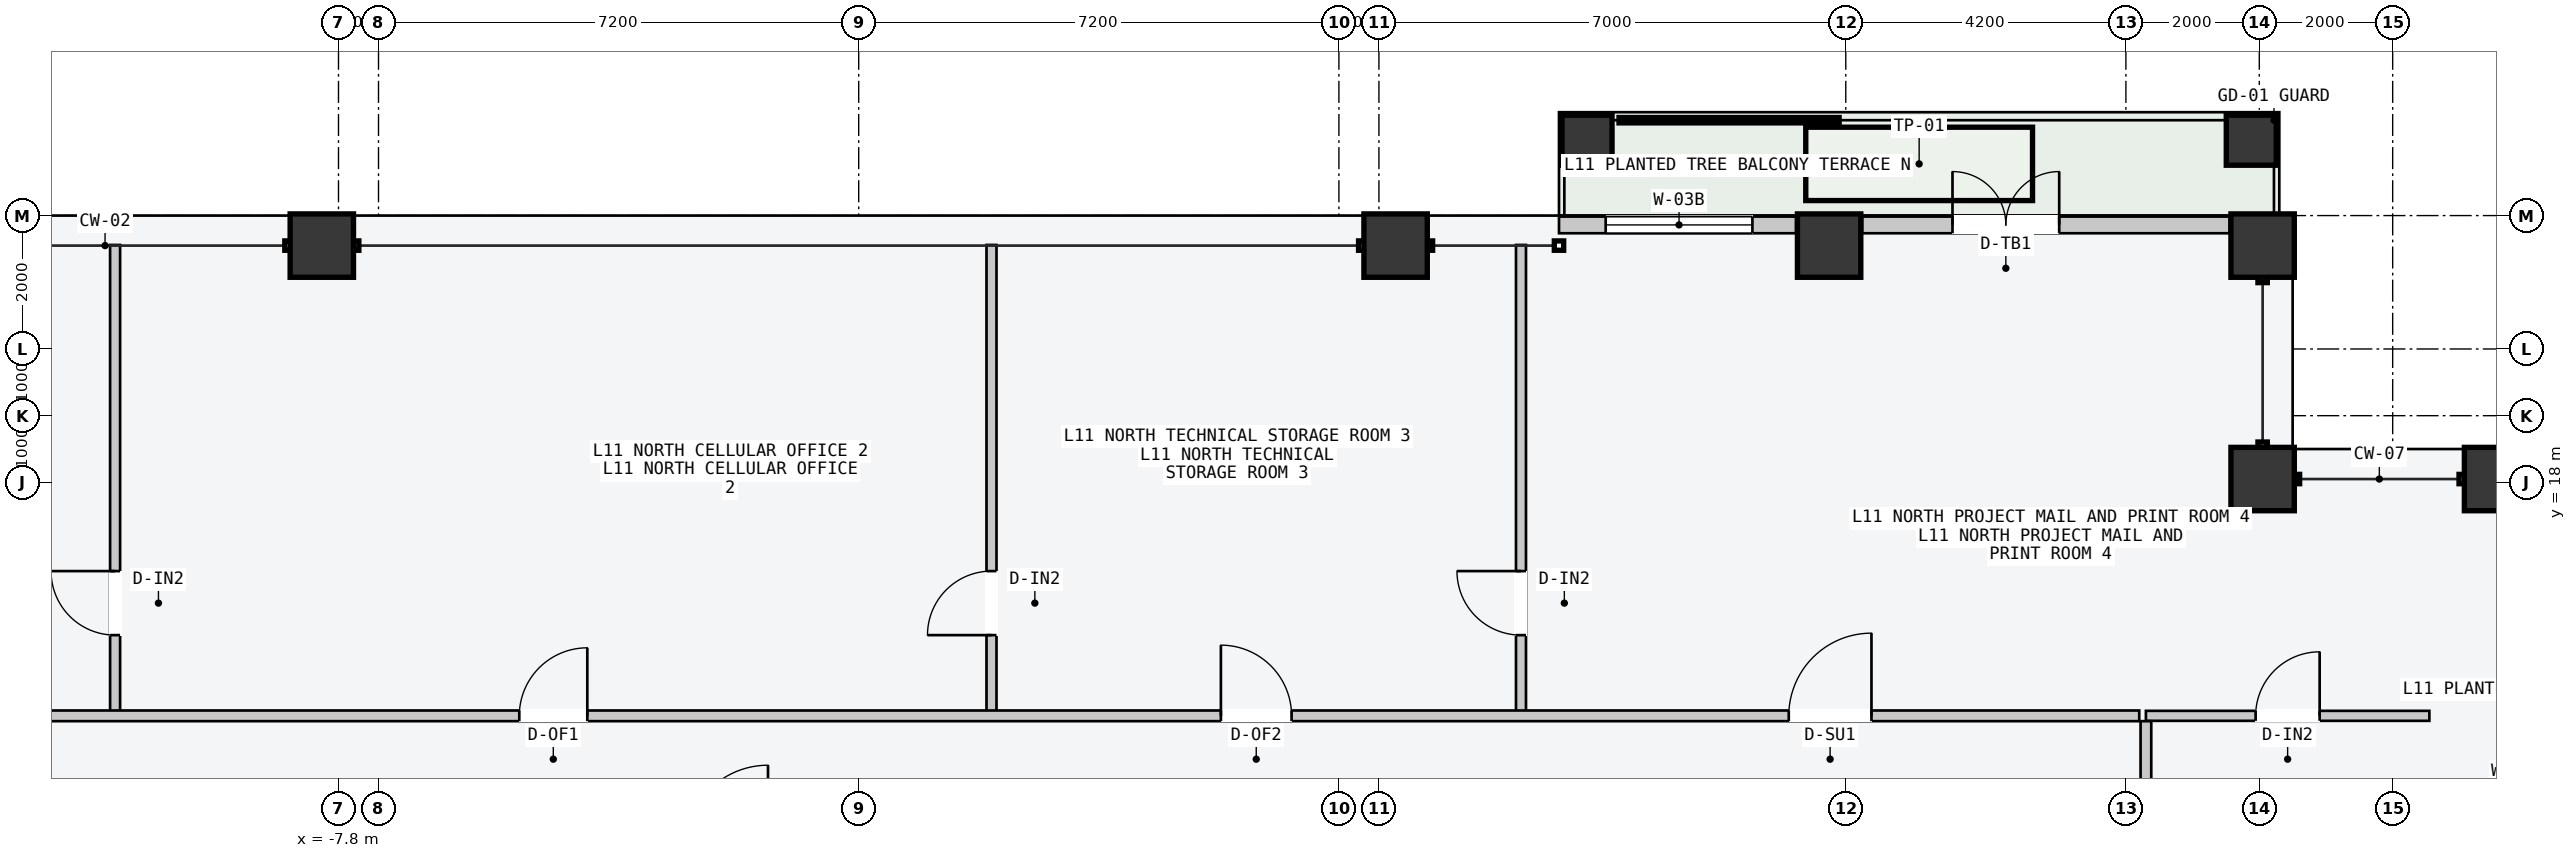
"""IFC4 building model, lengths in metres.
Left out: names, types, materials, properties, quantities, classifications, styles, units other than length and angle.
Written with IfcOpenShell. Run it as: python <this file> out.ifc"""

import sys

from ifc_helpers import new_model, si_unit, direction, frame, frame_2d, origin, origin_2d, place, context, subcontext, project, spatial, rectangle, hollow_rectangle, extrude, element, fill, save


model = new_model("IFC4")
c1 = context("Model", 3, precision=1e-05, world=origin(), true_north=direction((0.0, 1.0)))
c2 = subcontext(c1, "Body", "Model", "MODEL_VIEW")
j1 = project(units=[si_unit("LENGTHUNIT", "METRE"), si_unit("PLANEANGLEUNIT", "RADIAN")], contexts=[c1])
p1 = place(None, origin())
s1 = spatial("IfcSite", under=j1, at=p1, CompositionType="ELEMENT")
p2 = place(p1, origin())
s2 = spatial("IfcBuilding", under=s1, at=p2, CompositionType="ELEMENT")
p3 = place(p2, frame((0.0, 0.0, 45.6)))
s3 = spatial("IfcBuildingStorey", under=s2, at=p3, CompositionType="ELEMENT", Elevation=45.6)
for number, where, z_axis, x_axis in (
    (1, (-8.05, 21.55, 0.0), (0.0, 0.0, 1.0), (1.0, 0.0, 0.0)),
    (2, (8.05, 21.55, 0.0), (0.0, 0.0, 1.0), (1.0, 0.0, 0.0)),
    (3, (14.55, 21.55, 0.0), (0.0, 0.0, 1.0), (1.0, 0.0, 0.0)),
    (4, (21.05, 21.55, 0.0), (0.0, 0.0, 1.0), (1.0, 0.0, 0.0)),
    (5, (24.55, 18.05, 0.0), (0.0, 0.0, 1.0), (0.0, 1.0, 0.0)),
    (6, (21.05, 18.05, 0.0), (0.0, 0.0, 1.0), (1.0, 0.0, 0.0)),
):
    element("IfcColumn", number, at=place(p3, frame(where, z_axis=z_axis, x_axis=x_axis)), inside=s3, PredefinedType="COLUMN", context=c2, shape_type="SweptSolid", body=[
        extrude(hollow_rectangle(XDim=0.95, YDim=0.95, WallThickness=0.048, at=origin_2d()), origin(), (0.0, 0.0, 1.0), 3.6),
    ])
for number, where, z_axis, x_axis in (
    (7, (10.92, 23.13, 0.0), (0.0, 0.0, 1.0), (1.0, 0.0, 0.0)),
    (8, (20.88, 23.13, 0.0), (0.0, 0.0, 1.0), (1.0, 0.0, 0.0)),
):
    element("IfcColumn", number, at=place(p3, frame(where, z_axis=z_axis, x_axis=x_axis)), inside=s3, PredefinedType="COLUMN", context=c2, shape_type="SweptSolid", body=[
        extrude(hollow_rectangle(XDim=0.75, YDim=0.75, WallThickness=0.032, at=origin_2d()), origin(), (0.0, 0.0, 1.0), 3.6),
    ])
p4 = place(p3, frame((10.5, 21.86, 0.0), z_axis=(0.0, 0.0, 1.0), x_axis=(1.0, 0.0, 0.0)))
e9 = element("IfcWall", 9, at=p4, inside=s3, PredefinedType="STANDARD", context=c2, shape_type="SweptSolid", body=[
    extrude(rectangle(XDim=3.555, YDim=0.25, at=frame_2d((1.777, 0.0))), origin(), (0.0, 0.0, 1.0), 3.4),
])
p5 = place(p4, frame((0.7, 0.0, 0.85)))
e10 = element("IfcOpeningElement", 10, at=p5, cuts=e9, PredefinedType="OPENING", context=c2, shape_type="SweptSolid", body=[
    extrude(rectangle(XDim=2.2, YDim=2.1, at=frame_2d((1.1, 1.05))), frame((0.0, 0.135, 0.0), z_axis=(0.0, -1.0, 0.0), x_axis=(1.0, 0.0, 0.0)), (0.0, 0.0, 1.0), 0.27),
])
p6 = place(p3, frame((15.045, 21.86, 0.0), z_axis=(0.0, 0.0, 1.0), x_axis=(1.0, 0.0, 0.0)))
e11 = element("IfcWall", 11, at=p6, inside=s3, PredefinedType="STANDARD", context=c2, shape_type="SweptSolid", body=[
    extrude(rectangle(XDim=5.51, YDim=0.25, at=frame_2d((2.755, 0.0))), origin(), (0.0, 0.0, 1.0), 3.4),
])
p7 = place(p6, frame((1.355, 0.0, 0.0)))
e12 = element("IfcOpeningElement", 12, at=p7, cuts=e11, PredefinedType="OPENING", context=c2, shape_type="SweptSolid", body=[
    extrude(rectangle(XDim=1.6, YDim=2.2, at=frame_2d((0.8, 1.1))), frame((0.0, 0.135, 0.0), z_axis=(0.0, -1.0, 0.0), x_axis=(1.0, 0.0, 0.0)), (0.0, 0.0, 1.0), 0.27),
])
p8 = place(p3, frame((-11.15, 14.56, 0.0), z_axis=(0.0, 0.0, 1.0), x_axis=(0.0, 1.0, 0.0)))
e13 = element("IfcWall", 13, at=p8, inside=s3, PredefinedType="PARTITIONING", context=c2, shape_type="SweptSolid", body=[
    extrude(rectangle(XDim=7.0, YDim=0.15, at=frame_2d((3.5, 0.0))), origin(), (0.0, 0.0, 1.0), 3.4),
])
p9 = place(p8, frame((1.15, 0.0, 0.0)))
e14 = element("IfcOpeningElement", 14, at=p9, cuts=e13, PredefinedType="OPENING", context=c2, shape_type="SweptSolid", body=[
    extrude(rectangle(XDim=0.96, YDim=2.18, at=frame_2d((0.48, 1.09))), frame((0.0, 0.085, 0.0), z_axis=(0.0, -1.0, 0.0), x_axis=(1.0, 0.0, 0.0)), (0.0, 0.0, 1.0), 0.17),
])
p10 = place(p3, frame((1.991, 14.56, 0.0), z_axis=(0.0, 0.0, 1.0), x_axis=(0.0, 1.0, 0.0)))
e15 = element("IfcWall", 15, at=p10, inside=s3, PredefinedType="PARTITIONING", context=c2, shape_type="SweptSolid", body=[
    extrude(rectangle(XDim=7.0, YDim=0.15, at=frame_2d((3.5, 0.0))), origin(), (0.0, 0.0, 1.0), 3.4),
])
p11 = place(p10, frame((1.15, 0.0, 0.0)))
e16 = element("IfcOpeningElement", 16, at=p11, cuts=e15, PredefinedType="OPENING", context=c2, shape_type="SweptSolid", body=[
    extrude(rectangle(XDim=0.96, YDim=2.18, at=frame_2d((0.48, 1.09))), frame((0.0, 0.085, 0.0), z_axis=(0.0, -1.0, 0.0), x_axis=(1.0, 0.0, 0.0)), (0.0, 0.0, 1.0), 0.17),
])
p12 = place(p3, frame((9.93, 14.56, 0.0), z_axis=(0.0, 0.0, 1.0), x_axis=(0.0, 1.0, 0.0)))
e17 = element("IfcWall", 17, at=p12, inside=s3, PredefinedType="PARTITIONING", context=c2, shape_type="SweptSolid", body=[
    extrude(rectangle(XDim=7.0, YDim=0.15, at=frame_2d((3.5, 0.0))), origin(), (0.0, 0.0, 1.0), 3.4),
])
p13 = place(p12, frame((1.15, 0.0, 0.0)))
e18 = element("IfcOpeningElement", 18, at=p13, cuts=e17, PredefinedType="OPENING", context=c2, shape_type="SweptSolid", body=[
    extrude(rectangle(XDim=0.96, YDim=2.18, at=frame_2d((0.48, 1.09))), frame((0.0, 0.085, 0.0), z_axis=(0.0, -1.0, 0.0), x_axis=(1.0, 0.0, 0.0)), (0.0, 0.0, 1.0), 0.17),
])
p14 = place(p3, frame((-19.2, 14.5, 0.0), z_axis=(0.0, 0.0, 1.0), x_axis=(1.0, 0.0, 0.0)))
e19 = element("IfcWall", 19, at=p14, inside=s3, PredefinedType="PARTITIONING", context=c2, shape_type="SweptSolid", body=[
    extrude(rectangle(XDim=38.4, YDim=0.16, at=frame_2d((19.2, 0.0))), origin(), (0.0, 0.0, 1.0), 3.4),
])
p15 = place(p14, frame((3.545, 0.0, 0.0)))
e20 = element("IfcOpeningElement", 20, at=p15, cuts=e19, PredefinedType="OPENING", context=c2, shape_type="SweptSolid", body=[
    extrude(rectangle(XDim=0.96, YDim=2.18, at=frame_2d((0.48, 1.09))), frame((0.0, 0.09, 0.0), z_axis=(0.0, -1.0, 0.0), x_axis=(1.0, 0.0, 0.0)), (0.0, 0.0, 1.0), 0.18),
])
p16 = place(p14, frame((14.111, 0.0, 0.0)))
e21 = element("IfcOpeningElement", 21, at=p16, cuts=e19, PredefinedType="OPENING", context=c2, shape_type="SweptSolid", body=[
    extrude(rectangle(XDim=1.02, YDim=2.2, at=frame_2d((0.51, 1.1))), frame((0.0, 0.09, 0.0), z_axis=(0.0, -1.0, 0.0), x_axis=(1.0, 0.0, 0.0)), (0.0, 0.0, 1.0), 0.18),
])
p17 = place(p14, frame((24.631, 0.0, 0.0)))
e22 = element("IfcOpeningElement", 22, at=p17, cuts=e19, PredefinedType="OPENING", context=c2, shape_type="SweptSolid", body=[
    extrude(rectangle(XDim=1.06, YDim=2.2, at=frame_2d((0.53, 1.1))), frame((0.0, 0.09, 0.0), z_axis=(0.0, -1.0, 0.0), x_axis=(1.0, 0.0, 0.0)), (0.0, 0.0, 1.0), 0.18),
])
p18 = place(p14, frame((33.145, 0.0, 0.0)))
e23 = element("IfcOpeningElement", 23, at=p18, cuts=e19, PredefinedType="OPENING", context=c2, shape_type="SweptSolid", body=[
    extrude(rectangle(XDim=1.24, YDim=2.24, at=frame_2d((0.62, 1.12))), frame((0.0, 0.09, 0.0), z_axis=(0.0, -1.0, 0.0), x_axis=(1.0, 0.0, 0.0)), (0.0, 0.0, 1.0), 0.18),
])
p19 = place(p3, frame((19.3, 14.5, 0.0), z_axis=(0.0, 0.0, 1.0), x_axis=(1.0, 0.0, 0.0)))
e24 = element("IfcWall", 24, at=p19, inside=s3, PredefinedType="PARTITIONING", context=c2, shape_type="SweptSolid", body=[
    extrude(rectangle(XDim=4.25, YDim=0.15, at=frame_2d((2.125, 0.0))), origin(), (0.0, 0.0, 1.0), 3.4),
])
p20 = place(p19, frame((1.645, 0.0, 0.0)))
e25 = element("IfcOpeningElement", 25, at=p20, cuts=e24, PredefinedType="OPENING", context=c2, shape_type="SweptSolid", body=[
    extrude(rectangle(XDim=0.96, YDim=2.18, at=frame_2d((0.48, 1.09))), frame((0.0, 0.085, 0.0), z_axis=(0.0, -1.0, 0.0), x_axis=(1.0, 0.0, 0.0)), (0.0, 0.0, 1.0), 0.17),
])
p21 = place(p3, frame((19.3, -12.12, 0.0), z_axis=(0.0, 0.0, 1.0), x_axis=(0.0, 1.0, 0.0)))
e26 = element("IfcWall", 26, at=p21, inside=s3, PredefinedType="PARTITIONING", context=c2, shape_type="SweptSolid", body=[
    extrude(rectangle(XDim=26.54, YDim=0.16, at=frame_2d((13.27, 0.0))), origin(), (0.0, 0.0, 1.0), 3.4),
])
p22 = place(p21, frame((5.063, 0.0, 0.0)))
e27 = element("IfcOpeningElement", 27, at=p22, cuts=e26, PredefinedType="OPENING", context=c2, shape_type="SweptSolid", body=[
    extrude(rectangle(XDim=1.02, YDim=2.2, at=frame_2d((0.51, 1.1))), frame((0.0, 0.09, 0.0), z_axis=(0.0, -1.0, 0.0), x_axis=(1.0, 0.0, 0.0)), (0.0, 0.0, 1.0), 0.18),
])
p23 = place(p21, frame((18.313, 0.0, 0.0)))
e28 = element("IfcOpeningElement", 28, at=p23, cuts=e26, PredefinedType="OPENING", context=c2, shape_type="SweptSolid", body=[
    extrude(rectangle(XDim=1.06, YDim=2.2, at=frame_2d((0.53, 1.1))), frame((0.0, 0.09, 0.0), z_axis=(0.0, -1.0, 0.0), x_axis=(1.0, 0.0, 0.0)), (0.0, 0.0, 1.0), 0.18),
])
p24 = place(p5, origin())
e29 = element("IfcWindow", 29, at=p24, inside=s3, PartitioningType="SINGLE_PANEL", PredefinedType="WINDOW", context=c2, shape_type="SweptSolid", body=[
    extrude(rectangle(XDim=2.2, YDim=2.1, at=frame_2d((1.1, 1.05))), frame((0.0, 0.03, 0.0), z_axis=(0.0, -1.0, 0.0), x_axis=(1.0, 0.0, 0.0)), (0.0, 0.0, 1.0), 0.06),
])
fill(e10, e29)
p25 = place(p7, origin())
e30 = element("IfcDoor", 30, at=p25, inside=s3, OperationType="DOUBLE_DOOR_SINGLE_SWING", PredefinedType="DOOR", context=c2, shape_type="SweptSolid", body=[
    extrude(rectangle(XDim=1.6, YDim=2.2, at=frame_2d((0.8, 1.1))), frame((0.0, 0.025, 0.0), z_axis=(0.0, -1.0, 0.0), x_axis=(1.0, 0.0, 0.0)), (0.0, 0.0, 1.0), 0.05),
])
fill(e12, e30)
p26 = place(p9, origin())
e31 = element("IfcDoor", 31, at=p26, inside=s3, OperationType="SINGLE_SWING_RIGHT", PredefinedType="DOOR", context=c2, shape_type="SweptSolid", body=[
    extrude(rectangle(XDim=0.96, YDim=2.18, at=frame_2d((0.48, 1.09))), frame((0.0, 0.025, 0.0), z_axis=(0.0, -1.0, 0.0), x_axis=(1.0, 0.0, 0.0)), (0.0, 0.0, 1.0), 0.05),
])
fill(e14, e31)
p27 = place(p11, origin())
e32 = element("IfcDoor", 32, at=p27, inside=s3, OperationType="SINGLE_SWING_LEFT", PredefinedType="DOOR", context=c2, shape_type="SweptSolid", body=[
    extrude(rectangle(XDim=0.96, YDim=2.18, at=frame_2d((0.48, 1.09))), frame((0.0, 0.025, 0.0), z_axis=(0.0, -1.0, 0.0), x_axis=(1.0, 0.0, 0.0)), (0.0, 0.0, 1.0), 0.05),
])
fill(e16, e32)
p28 = place(p13, origin())
e33 = element("IfcDoor", 33, at=p28, inside=s3, OperationType="SINGLE_SWING_RIGHT", PredefinedType="DOOR", context=c2, shape_type="SweptSolid", body=[
    extrude(rectangle(XDim=0.96, YDim=2.18, at=frame_2d((0.48, 1.09))), frame((0.0, 0.025, 0.0), z_axis=(0.0, -1.0, 0.0), x_axis=(1.0, 0.0, 0.0)), (0.0, 0.0, 1.0), 0.05),
])
fill(e18, e33)
p29 = place(p16, origin())
e34 = element("IfcDoor", 34, at=p29, inside=s3, OperationType="SINGLE_SWING_RIGHT", PredefinedType="DOOR", context=c2, shape_type="SweptSolid", body=[
    extrude(rectangle(XDim=1.02, YDim=2.2, at=frame_2d((0.51, 1.1))), frame((0.0, 0.025, 0.0), z_axis=(0.0, -1.0, 0.0), x_axis=(1.0, 0.0, 0.0)), (0.0, 0.0, 1.0), 0.05),
])
fill(e21, e34)
p30 = place(p17, origin())
e35 = element("IfcDoor", 35, at=p30, inside=s3, OperationType="SINGLE_SWING_LEFT", PredefinedType="DOOR", context=c2, shape_type="SweptSolid", body=[
    extrude(rectangle(XDim=1.06, YDim=2.2, at=frame_2d((0.53, 1.1))), frame((0.0, 0.025, 0.0), z_axis=(0.0, -1.0, 0.0), x_axis=(1.0, 0.0, 0.0)), (0.0, 0.0, 1.0), 0.05),
])
fill(e22, e35)
p31 = place(p18, origin())
e36 = element("IfcDoor", 36, at=p31, inside=s3, OperationType="SINGLE_SWING_RIGHT", PredefinedType="DOOR", context=c2, shape_type="SweptSolid", body=[
    extrude(rectangle(XDim=1.24, YDim=2.24, at=frame_2d((0.62, 1.12))), frame((0.0, 0.025, 0.0), z_axis=(0.0, -1.0, 0.0), x_axis=(1.0, 0.0, 0.0)), (0.0, 0.0, 1.0), 0.05),
])
fill(e23, e36)
p32 = place(p20, origin())
e37 = element("IfcDoor", 37, at=p32, inside=s3, OperationType="SINGLE_SWING_RIGHT", PredefinedType="DOOR", context=c2, shape_type="SweptSolid", body=[
    extrude(rectangle(XDim=0.96, YDim=2.18, at=frame_2d((0.48, 1.09))), frame((0.0, 0.025, 0.0), z_axis=(0.0, -1.0, 0.0), x_axis=(1.0, 0.0, 0.0)), (0.0, 0.0, 1.0), 0.05),
])
fill(e25, e37)
save(model, sys.argv[1])
